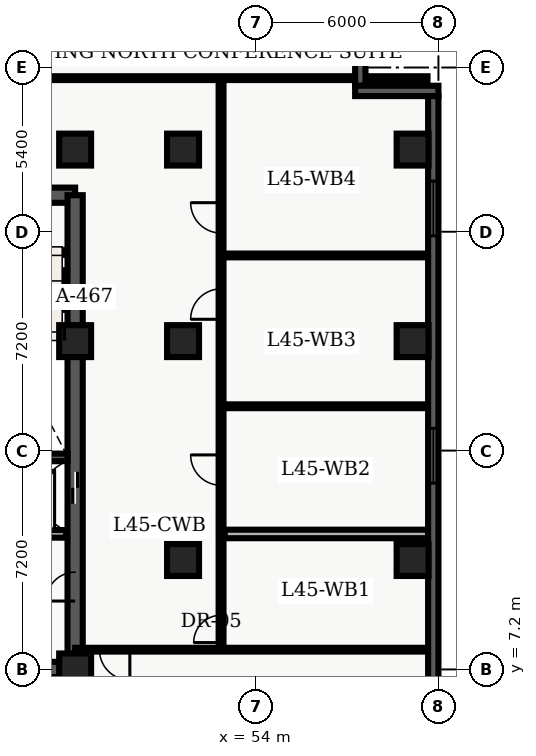
"""IFC4 building model, lengths in metres.
Left out: names, types, materials, properties, quantities, classifications, styles, units other than length and angle.
Written with IfcOpenShell. Run it as: python <this file> out.ifc"""

import sys

from ifc_helpers import new_model, entity, si_unit, converted_unit, direction, frame, origin_with_axes, origin_2d_with_axis, place, context, subcontext, project, spatial, polyline, rectangle, outline, extrude, element, fill, save


model = new_model("IFC4")
c1 = context("Model", 3, precision=1e-05, world=origin_with_axes(), true_north=direction((0.0, 1.0)))
c2 = subcontext(c1, "Body", "Model", "MODEL_VIEW")
j1 = project(units=[si_unit("LENGTHUNIT", "METRE"), converted_unit("PLANEANGLEUNIT", "DEGREE", entity("IfcPlaneAngleMeasure", 0.017), si_unit("PLANEANGLEUNIT", "RADIAN"), dimensions=[0, 0, 0, 0, 0, 0, 0])], contexts=[c1])
p1 = place(None, origin_with_axes())
s1 = spatial("IfcSite", under=j1, at=p1, CompositionType="ELEMENT")
p2 = place(p1, origin_with_axes())
s2 = spatial("IfcBuilding", under=s1, at=p2, CompositionType="ELEMENT")
p3 = place(p2, frame((0.0, 0.0, 183.6), z_axis=(0.0, 0.0, 1.0), x_axis=(1.0, 0.0, 0.0)))
s3 = spatial("IfcBuildingStorey", under=s2, at=p3, CompositionType="ELEMENT", Elevation=183.6)
p4 = place(p3, frame((40.2, 7.2, 0.0), z_axis=(0.0, 0.0, 1.0), x_axis=(1.0, 0.0, 0.0)))
e1 = element("IfcWall", 1, at=p4, inside=s3, PredefinedType="SHEAR", context=c2, shape_type="SweptSolid", body=[
    extrude(outline(polyline([(0.0, -0.25), (7.85, -0.25), (7.85, 0.25), (0.0, 0.25), (0.0, -0.25)])), origin_with_axes(), (0.0, 0.0, 1.0), 3.6),
])
p5 = place(p4, frame((2.175, 0.0, 0.0), z_axis=(0.0, 0.0, 1.0), x_axis=(1.0, 0.0, 0.0)))
e2 = element("IfcOpeningElement", 2, at=p5, cuts=e1, PredefinedType="OPENING", context=c2, shape_type="SweptSolid", body=[
    extrude(rectangle(XDim=1.05, YDim=0.52, at=origin_2d_with_axis()), origin_with_axes(), (0.0, 0.0, 1.0), 2.15),
])
p6 = place(p3, frame((40.2, 22.8, 0.0), z_axis=(0.0, 0.0, 1.0), x_axis=(1.0, 0.0, 0.0)))
e3 = element("IfcWall", 3, at=p6, inside=s3, PredefinedType="SHEAR", context=c2, shape_type="SweptSolid", body=[
    extrude(outline(polyline([(0.0, -0.25), (7.85, -0.25), (7.85, 0.25), (0.0, 0.25), (0.0, -0.25)])), origin_with_axes(), (0.0, 0.0, 1.0), 3.6),
])
p7 = place(p6, frame((5.775, 0.0, 0.0), z_axis=(0.0, 0.0, 1.0), x_axis=(1.0, 0.0, 0.0)))
e4 = element("IfcOpeningElement", 4, at=p7, cuts=e3, PredefinedType="OPENING", context=c2, shape_type="SweptSolid", body=[
    extrude(rectangle(XDim=1.05, YDim=0.52, at=origin_2d_with_axis()), origin_with_axes(), (0.0, 0.0, 1.0), 2.15),
])
p8 = place(p3, frame((48.05, 7.2, 0.0), z_axis=(0.0, 0.0, 1.0), x_axis=(0.0, 1.0, 0.0)))
e5 = element("IfcWall", 5, at=p8, inside=s3, PredefinedType="SHEAR", context=c2, shape_type="SweptSolid", body=[
    extrude(outline(polyline([(0.0, -0.25), (15.6, -0.25), (15.6, 0.25), (0.0, 0.25), (0.0, -0.25)])), origin_with_axes(), (0.0, 0.0, 1.0), 3.6),
])
p9 = place(p8, frame((5.975, 0.0, 0.0), z_axis=(0.0, 0.0, 1.0), x_axis=(1.0, 0.0, 0.0)))
e6 = element("IfcOpeningElement", 6, at=p9, cuts=e5, PredefinedType="OPENING", context=c2, shape_type="SweptSolid", body=[
    extrude(rectangle(XDim=1.05, YDim=0.52, at=origin_2d_with_axis()), origin_with_axes(), (0.0, 0.0, 1.0), 2.15),
])
p10 = place(p8, frame((2.725, 0.0, 0.0), z_axis=(0.0, 0.0, 1.0), x_axis=(1.0, 0.0, 0.0)))
e7 = element("IfcOpeningElement", 7, at=p10, cuts=e5, PredefinedType="OPENING", context=c2, shape_type="SweptSolid", body=[
    extrude(rectangle(XDim=0.95, YDim=0.52, at=origin_2d_with_axis()), origin_with_axes(), (0.0, 0.0, 1.0), 2.15),
])
p11 = place(p3, frame((44.25, 14.175, 0.0), z_axis=(0.0, 0.0, 1.0), x_axis=(1.0, 0.0, 0.0)))
e8 = element("IfcWall", 8, at=p11, inside=s3, PredefinedType="SHEAR", context=c2, shape_type="SweptSolid", body=[
    extrude(outline(polyline([(0.0, -0.125), (3.55, -0.125), (3.55, 0.125), (0.0, 0.125), (0.0, -0.125)])), origin_with_axes(), (0.0, 0.0, 1.0), 3.6),
])
for number, where, z_axis, x_axis in (
    (9, (48.05, 7.2, 0.0), (0.0, 0.0, 1.0), (1.0, 0.0, 0.0)),
    (10, (48.05, 18.0, 0.0), (0.0, 0.0, 1.0), (1.0, 0.0, 0.0)),
    (11, (48.05, 24.3, 0.0), (0.0, 0.0, 1.0), (1.0, 0.0, 0.0)),
    (12, (51.6, 10.8, 0.0), (0.0, 0.0, 1.0), (1.0, 0.0, 0.0)),
    (13, (51.6, 18.0, 0.0), (0.0, 0.0, 1.0), (1.0, 0.0, 0.0)),
    (14, (51.6, 24.3, 0.0), (0.0, 0.0, 1.0), (1.0, 0.0, 0.0)),
    (15, (59.15, 10.8, 0.0), (0.0, 0.0, 1.0), (1.0, 0.0, 0.0)),
    (16, (59.15, 18.0, 0.0), (0.0, 0.0, 1.0), (1.0, 0.0, 0.0)),
    (17, (59.15, 24.3, 0.0), (0.0, 0.0, 1.0), (1.0, 0.0, 0.0)),
):
    element("IfcColumn", number, at=place(p3, frame(where, z_axis=z_axis, x_axis=x_axis)), inside=s3, PredefinedType="COLUMN", context=c2, shape_type="SweptSolid", body=[
        extrude(rectangle(XDim=1.05, YDim=1.05, at=origin_2d_with_axis()), origin_with_axes(), (0.0, 0.0, 1.0), 3.9),
    ])
p12 = place(p3, frame((44.25, 11.66, 0.0), z_axis=(0.0, 0.0, 1.0), x_axis=(1.0, 0.0, 0.0)))
e18 = element("IfcWall", 18, at=p12, inside=s3, PredefinedType="SOLIDWALL", context=c2, shape_type="SweptSolid", body=[
    extrude(outline(polyline([(0.0, -0.125), (3.5, -0.125), (3.5, 0.125), (0.0, 0.125), (0.0, -0.125)])), origin_with_axes(), (0.0, 0.0, 1.0), 2.64),
])
p13 = place(p3, frame((52.85, 7.85, 0.0), z_axis=(0.0, 0.0, 1.0), x_axis=(0.0, 1.0, 0.0)))
e19 = element("IfcWall", 19, at=p13, inside=s3, PredefinedType="PARTITIONING", context=c2, shape_type="SweptSolid", body=[
    extrude(outline(polyline([(0.0, -0.08), (18.8, -0.08), (18.8, 0.08), (0.0, 0.08), (0.0, -0.08)])), origin_with_axes(), (0.0, 0.0, 1.0), 2.64),
])
p14 = place(p13, frame((0.684, 0.0, 0.0), z_axis=(0.0, 0.0, 1.0), x_axis=(1.0, 0.0, 0.0)))
e20 = element("IfcOpeningElement", 20, at=p14, cuts=e19, PredefinedType="OPENING", context=c2, shape_type="SweptSolid", body=[
    extrude(rectangle(XDim=0.9, YDim=0.18, at=origin_2d_with_axis()), origin_with_axes(), (0.0, 0.0, 1.0), 2.15),
])
p15 = place(p13, frame((5.907, 0.0, 0.0), z_axis=(0.0, 0.0, 1.0), x_axis=(1.0, 0.0, 0.0)))
e21 = element("IfcOpeningElement", 21, at=p15, cuts=e19, PredefinedType="OPENING", context=c2, shape_type="SweptSolid", body=[
    extrude(rectangle(XDim=1.0, YDim=0.18, at=origin_2d_with_axis()), origin_with_axes(), (0.0, 0.0, 1.0), 2.15),
])
p16 = place(p13, frame((11.368, 0.0, 0.0), z_axis=(0.0, 0.0, 1.0), x_axis=(1.0, 0.0, 0.0)))
e22 = element("IfcOpeningElement", 22, at=p16, cuts=e19, PredefinedType="OPENING", context=c2, shape_type="SweptSolid", body=[
    extrude(rectangle(XDim=1.0, YDim=0.18, at=origin_2d_with_axis()), origin_with_axes(), (0.0, 0.0, 1.0), 2.15),
])
p17 = place(p13, frame((14.204, 0.0, 0.0), z_axis=(0.0, 0.0, 1.0), x_axis=(1.0, 0.0, 0.0)))
e23 = element("IfcOpeningElement", 23, at=p17, cuts=e19, PredefinedType="OPENING", context=c2, shape_type="SweptSolid", body=[
    extrude(rectangle(XDim=1.0, YDim=0.18, at=origin_2d_with_axis()), origin_with_axes(), (0.0, 0.0, 1.0), 2.15),
])
p18 = place(p3, frame((59.665, 7.85, 0.0), z_axis=(0.0, 0.0, 1.0), x_axis=(-1.0, 0.0, 0.0)))
e24 = element("IfcWall", 24, at=p18, inside=s3, PredefinedType="PARTITIONING", context=c2, shape_type="SweptSolid", body=[
    extrude(outline(polyline([(0.0, -0.062), (11.615, -0.062), (11.615, 0.062), (0.0, 0.062), (0.0, -0.062)])), origin_with_axes(), (0.0, 0.0, 1.0), 2.64),
])
p19 = place(p18, frame((10.315, 0.0, 0.0), z_axis=(0.0, 0.0, 1.0), x_axis=(1.0, 0.0, 0.0)))
e25 = element("IfcOpeningElement", 25, at=p19, cuts=e24, PredefinedType="OPENING", context=c2, shape_type="SweptSolid", body=[
    extrude(rectangle(XDim=1.0, YDim=0.145, at=origin_2d_with_axis()), origin_with_axes(), (0.0, 0.0, 1.0), 2.15),
])
p20 = place(p3, frame((38.735, 26.65, 0.0), z_axis=(0.0, 0.0, 1.0), x_axis=(1.0, 0.0, 0.0)))
e26 = element("IfcWall", 26, at=p20, inside=s3, PredefinedType="PARTITIONING", context=c2, shape_type="SweptSolid", body=[
    extrude(outline(polyline([(0.0, -0.062), (20.905, -0.062), (20.905, 0.062), (0.0, 0.062), (0.0, -0.062)])), origin_with_axes(), (0.0, 0.0, 1.0), 2.64),
])
p21 = place(p20, frame((4.265, 0.0, 0.0), z_axis=(0.0, 0.0, 1.0), x_axis=(1.0, 0.0, 0.0)))
e27 = element("IfcOpeningElement", 27, at=p21, cuts=e26, PredefinedType="OPENING", context=c2, shape_type="SweptSolid", body=[
    extrude(rectangle(XDim=1.0, YDim=0.145, at=origin_2d_with_axis()), origin_with_axes(), (0.0, 0.0, 1.0), 2.15),
])
p22 = place(p3, frame((52.97, 11.657, 0.0), z_axis=(0.0, 0.0, 1.0), x_axis=(1.0, 0.0, 0.0)))
e28 = element("IfcWall", 28, at=p22, inside=s3, PredefinedType="PARTITIONING", context=c2, shape_type="SweptSolid", body=[
    extrude(outline(polyline([(0.0, -0.14), (6.695, -0.14), (6.695, 0.14), (0.0, 0.14), (0.0, -0.14)])), origin_with_axes(), (0.0, 0.0, 1.0), 2.64),
])
for number, where, z_axis, x_axis in (
    (29, (52.97, 15.857, 0.0), (0.0, 0.0, 1.0), (1.0, 0.0, 0.0)),
    (30, (52.97, 20.818, 0.0), (0.0, 0.0, 1.0), (1.0, 0.0, 0.0)),
):
    element("IfcWall", number, at=place(p3, frame(where, z_axis=z_axis, x_axis=x_axis)), inside=s3, PredefinedType="PARTITIONING", context=c2, shape_type="SweptSolid", body=[
        extrude(outline(polyline([(0.0, -0.062), (6.695, -0.062), (6.695, 0.062), (0.0, 0.062), (0.0, -0.062)])), origin_with_axes(), (0.0, 0.0, 1.0), 2.64),
    ])
p23 = place(p3, frame((57.43, 28.46, 0.0), z_axis=(0.0, 0.0, 1.0), x_axis=(0.0, -1.0, 0.0)))
e31 = element("IfcWall", 31, at=p23, inside=s3, PredefinedType="SOLIDWALL", context=c2, shape_type="SweptSolid", body=[
    extrude(outline(polyline([(0.0, -0.17), (2.06, -0.17), (2.06, 0.17), (0.0, 0.17), (0.0, -0.17)])), origin_with_axes(), (0.0, 0.0, 1.0), 3.6),
])
p24 = place(p3, frame((57.26, 26.23, 0.0), z_axis=(0.0, 0.0, 1.0), x_axis=(1.0, 0.0, 0.0)))
e32 = element("IfcWall", 32, at=p24, inside=s3, PredefinedType="SOLIDWALL", context=c2, shape_type="SweptSolid", body=[
    extrude(outline(polyline([(0.0, -0.17), (2.74, -0.17), (2.74, 0.17), (0.0, 0.17), (0.0, -0.17)])), origin_with_axes(), (0.0, 0.0, 1.0), 3.6),
])
p25 = place(p3, frame((59.83, 26.06, 0.0), z_axis=(0.0, 0.0, 1.0), x_axis=(0.0, -1.0, 0.0)))
e33 = element("IfcWall", 33, at=p25, inside=s3, PredefinedType="SOLIDWALL", context=c2, shape_type="SweptSolid", body=[
    extrude(outline(polyline([(0.0, -0.17), (23.66, -0.17), (23.66, 0.17), (0.0, 0.17), (0.0, -0.17)])), origin_with_axes(), (0.0, 0.0, 1.0), 3.6),
])
p26 = place(p25, frame((3.696, 0.0, 0.45), z_axis=(0.0, 0.0, 1.0), x_axis=(1.0, 0.0, 0.0)))
e34 = element("IfcOpeningElement", 34, at=p26, cuts=e33, PredefinedType="OPENING", context=c2, shape_type="SweptSolid", body=[
    extrude(rectangle(XDim=1.8, YDim=0.36, at=origin_2d_with_axis()), origin_with_axes(), (0.0, 0.0, 1.0), 2.1),
])
p27 = place(p25, frame((11.83, 0.0, 0.45), z_axis=(0.0, 0.0, 1.0), x_axis=(1.0, 0.0, 0.0)))
e35 = element("IfcOpeningElement", 35, at=p27, cuts=e33, PredefinedType="OPENING", context=c2, shape_type="SweptSolid", body=[
    extrude(rectangle(XDim=1.8, YDim=0.36, at=origin_2d_with_axis()), origin_with_axes(), (0.0, 0.0, 1.0), 2.1),
])
p28 = place(p25, frame((20.364, 0.0, 0.45), z_axis=(0.0, 0.0, 1.0), x_axis=(1.0, 0.0, 0.0)))
e36 = element("IfcOpeningElement", 36, at=p28, cuts=e33, PredefinedType="OPENING", context=c2, shape_type="SweptSolid", body=[
    extrude(rectangle(XDim=1.8, YDim=0.36, at=origin_2d_with_axis()), origin_with_axes(), (0.0, 0.0, 1.0), 2.1),
])
p29 = place(p8, frame((5.975, 0.0, 0.0), z_axis=(0.0, 0.0, 1.0), x_axis=(1.0, 0.0, 0.0)))
e37 = element("IfcDoor", 37, at=p29, inside=s3, OperationType="SLIDING_TO_LEFT", PredefinedType="DOOR", context=c2, shape_type="SweptSolid", body=[
    extrude(rectangle(XDim=1.05, YDim=0.09, at=origin_2d_with_axis()), origin_with_axes(), (0.0, 0.0, 1.0), 2.15),
])
fill(e6, e37)
p30 = place(p8, frame((2.725, 0.0, 0.0), z_axis=(0.0, 0.0, 1.0), x_axis=(1.0, 0.0, 0.0)))
e38 = element("IfcDoor", 38, at=p30, inside=s3, OperationType="SINGLE_SWING_LEFT", PredefinedType="DOOR", context=c2, shape_type="SweptSolid", body=[
    extrude(rectangle(XDim=0.95, YDim=0.09, at=origin_2d_with_axis()), origin_with_axes(), (0.0, 0.0, 1.0), 2.15),
])
fill(e7, e38)
p31 = place(p18, frame((10.315, 0.0, 0.0), z_axis=(0.0, 0.0, 1.0), x_axis=(1.0, 0.0, 0.0)))
e39 = element("IfcDoor", 39, at=p31, inside=s3, OperationType="SINGLE_SWING_LEFT", PredefinedType="DOOR", context=c2, shape_type="SweptSolid", body=[
    extrude(rectangle(XDim=1.0, YDim=0.075, at=origin_2d_with_axis()), origin_with_axes(), (0.0, 0.0, 1.0), 2.15),
])
fill(e25, e39)
p32 = place(p13, frame((0.684, 0.0, 0.0), z_axis=(0.0, 0.0, 1.0), x_axis=(1.0, 0.0, 0.0)))
e40 = element("IfcDoor", 40, at=p32, inside=s3, OperationType="SINGLE_SWING_LEFT", PredefinedType="DOOR", context=c2, shape_type="SweptSolid", body=[
    extrude(rectangle(XDim=0.9, YDim=0.09, at=origin_2d_with_axis()), origin_with_axes(), (0.0, 0.0, 1.0), 2.15),
])
fill(e20, e40)
p33 = place(p13, frame((5.907, 0.0, 0.0), z_axis=(0.0, 0.0, 1.0), x_axis=(1.0, 0.0, 0.0)))
e41 = element("IfcDoor", 41, at=p33, inside=s3, OperationType="SINGLE_SWING_RIGHT", PredefinedType="DOOR", context=c2, shape_type="SweptSolid", body=[
    extrude(rectangle(XDim=1.0, YDim=0.09, at=origin_2d_with_axis()), origin_with_axes(), (0.0, 0.0, 1.0), 2.15),
])
fill(e21, e41)
p34 = place(p13, frame((11.368, 0.0, 0.0), z_axis=(0.0, 0.0, 1.0), x_axis=(1.0, 0.0, 0.0)))
e42 = element("IfcDoor", 42, at=p34, inside=s3, OperationType="SINGLE_SWING_LEFT", PredefinedType="DOOR", context=c2, shape_type="SweptSolid", body=[
    extrude(rectangle(XDim=1.0, YDim=0.09, at=origin_2d_with_axis()), origin_with_axes(), (0.0, 0.0, 1.0), 2.15),
])
fill(e22, e42)
p35 = place(p13, frame((14.204, 0.0, 0.0), z_axis=(0.0, 0.0, 1.0), x_axis=(1.0, 0.0, 0.0)))
e43 = element("IfcDoor", 43, at=p35, inside=s3, OperationType="SINGLE_SWING_RIGHT", PredefinedType="DOOR", context=c2, shape_type="SweptSolid", body=[
    extrude(rectangle(XDim=1.0, YDim=0.09, at=origin_2d_with_axis()), origin_with_axes(), (0.0, 0.0, 1.0), 2.15),
])
fill(e23, e43)
p36 = place(p25, frame((3.696, 0.0, 0.45), z_axis=(0.0, 0.0, 1.0), x_axis=(1.0, 0.0, 0.0)))
e44 = element("IfcWindow", 44, at=p36, inside=s3, PredefinedType="WINDOW", context=c2, shape_type="SweptSolid", body=[
    extrude(rectangle(XDim=1.8, YDim=0.09, at=origin_2d_with_axis()), origin_with_axes(), (0.0, 0.0, 1.0), 2.1),
])
fill(e34, e44)
p37 = place(p25, frame((11.83, 0.0, 0.45), z_axis=(0.0, 0.0, 1.0), x_axis=(1.0, 0.0, 0.0)))
e45 = element("IfcWindow", 45, at=p37, inside=s3, PredefinedType="WINDOW", context=c2, shape_type="SweptSolid", body=[
    extrude(rectangle(XDim=1.8, YDim=0.09, at=origin_2d_with_axis()), origin_with_axes(), (0.0, 0.0, 1.0), 2.1),
])
fill(e35, e45)
save(model, sys.argv[1])
